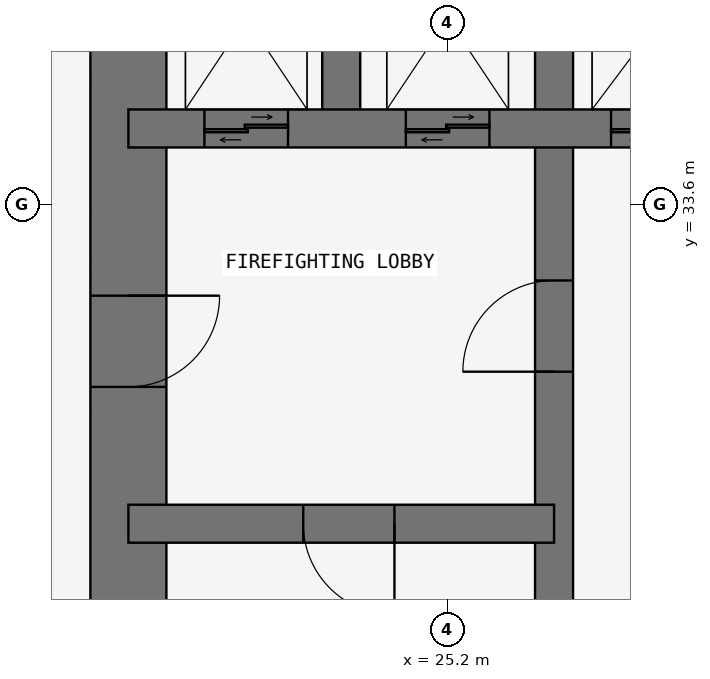
"""IFC4 building model, lengths in metres.
Left out: names, types, materials, properties, quantities, classifications, styles, units other than length and angle.
Written with IfcOpenShell. Run it as: python <this file> out.ifc"""

import sys

from ifc_helpers import new_model, si_unit, direction, frame, frame_2d, origin, place, context, subcontext, project, spatial, rectangle, extrude, element, fill, save


model = new_model("IFC4")
c1 = context("Model", 3, precision=1e-05, world=origin(), true_north=direction((0.0, 1.0)))
c2 = subcontext(c1, "Body", "Model", "MODEL_VIEW")
j1 = project(units=[si_unit("LENGTHUNIT", "METRE"), si_unit("PLANEANGLEUNIT", "RADIAN")], contexts=[c1])
p1 = place(None, origin())
s1 = spatial("IfcSite", under=j1, at=p1, CompositionType="ELEMENT")
p2 = place(p1, origin())
s2 = spatial("IfcBuilding", under=s1, at=p2, CompositionType="ELEMENT")
p3 = place(p2, frame((0.0, 0.0, 15.0)))
s3 = spatial("IfcBuildingStorey", under=s2, at=p3, CompositionType="ELEMENT", Elevation=15.0)
p4 = place(p3, frame((21.0, 37.8, 0.0), z_axis=(0.0, 0.0, 1.0), x_axis=(0.0, -1.0, 0.0)))
e1 = element("IfcWall", 1, at=p4, inside=s3, PredefinedType="SHEAR", context=c2, shape_type="SweptSolid", body=[
    extrude(rectangle(XDim=17.3, YDim=1.0, at=frame_2d((8.65, 0.0))), origin(), (0.0, 0.0, 1.0), 4.5),
])
p5 = place(p4, frame((5.4, 0.0, 0.0)))
e2 = element("IfcOpeningElement", 2, at=p5, cuts=e1, PredefinedType="OPENING", context=c2, shape_type="SweptSolid", body=[
    extrude(rectangle(XDim=1.2, YDim=2.1, at=frame_2d((0.6, 1.05))), frame((0.0, 0.51, 0.0), z_axis=(0.0, -1.0, 0.0), x_axis=(1.0, 0.0, 0.0)), (0.0, 0.0, 1.0), 1.02),
])
p6 = place(p3, frame((26.6, 21.0, 0.0), z_axis=(0.0, 0.0, 1.0), x_axis=(0.0, 1.0, 0.0)))
e3 = element("IfcWall", 3, at=p6, inside=s3, PredefinedType="SHEAR", context=c2, shape_type="SweptSolid", body=[
    extrude(rectangle(XDim=16.8, YDim=0.5, at=frame_2d((8.4, 0.0))), origin(), (0.0, 0.0, 1.0), 4.5),
])
p7 = place(p6, frame((10.4, 0.0, 0.0)))
e4 = element("IfcOpeningElement", 4, at=p7, cuts=e3, PredefinedType="OPENING", context=c2, shape_type="SweptSolid", body=[
    extrude(rectangle(XDim=1.2, YDim=2.1, at=frame_2d((0.6, 1.05))), frame((0.0, 0.26, 0.0), z_axis=(0.0, -1.0, 0.0), x_axis=(1.0, 0.0, 0.0)), (0.0, 0.0, 1.0), 0.52),
])
p8 = place(p3, frame((21.0, 29.4, 0.0), z_axis=(0.0, 0.0, 1.0), x_axis=(1.0, 0.0, 0.0)))
e5 = element("IfcWall", 5, at=p8, inside=s3, PredefinedType="SHEAR", context=c2, shape_type="SweptSolid", body=[
    extrude(rectangle(XDim=5.6, YDim=0.5, at=frame_2d((2.8, 0.0))), origin(), (0.0, 0.0, 1.0), 4.5),
])
p9 = place(p8, frame((2.3, 0.0, 0.0)))
e6 = element("IfcOpeningElement", 6, at=p9, cuts=e5, PredefinedType="OPENING", context=c2, shape_type="SweptSolid", body=[
    extrude(rectangle(XDim=1.2, YDim=2.1, at=frame_2d((0.6, 1.05))), frame((0.0, 0.26, 0.0), z_axis=(0.0, -1.0, 0.0), x_axis=(1.0, 0.0, 0.0)), (0.0, 0.0, 1.0), 0.52),
])
p10 = place(p3, frame((21.0, 34.6, 0.0), z_axis=(0.0, 0.0, 1.0), x_axis=(1.0, 0.0, 0.0)))
e7 = element("IfcWall", 7, at=p10, inside=s3, PredefinedType="SHEAR", context=c2, shape_type="SweptSolid", body=[
    extrude(rectangle(XDim=11.2, YDim=0.5, at=frame_2d((5.6, 0.0))), origin(), (0.0, 0.0, 1.0), 4.5),
])
p11 = place(p10, frame((9.35, 0.0, 0.0)))
e8 = element("IfcOpeningElement", 8, at=p11, cuts=e7, PredefinedType="OPENING", context=c2, shape_type="SweptSolid", body=[
    extrude(rectangle(XDim=0.9, YDim=2.1, at=frame_2d((0.45, 1.05))), frame((0.0, 0.26, 0.0), z_axis=(0.0, -1.0, 0.0), x_axis=(1.0, 0.0, 0.0)), (0.0, 0.0, 1.0), 0.52),
])
p12 = place(p10, frame((1.0, 0.0, 0.0)))
e9 = element("IfcOpeningElement", 9, at=p12, cuts=e7, PredefinedType="OPENING", context=c2, shape_type="SweptSolid", body=[
    extrude(rectangle(XDim=1.1, YDim=2.1, at=frame_2d((0.55, 1.05))), frame((0.0, 0.26, 0.0), z_axis=(0.0, -1.0, 0.0), x_axis=(1.0, 0.0, 0.0)), (0.0, 0.0, 1.0), 0.52),
])
p13 = place(p10, frame((3.65, 0.0, 0.0)))
e10 = element("IfcOpeningElement", 10, at=p13, cuts=e7, PredefinedType="OPENING", context=c2, shape_type="SweptSolid", body=[
    extrude(rectangle(XDim=1.1, YDim=2.1, at=frame_2d((0.55, 1.05))), frame((0.0, 0.26, 0.0), z_axis=(0.0, -1.0, 0.0), x_axis=(1.0, 0.0, 0.0)), (0.0, 0.0, 1.0), 0.52),
])
p14 = place(p10, frame((6.35, 0.0, 0.0)))
e11 = element("IfcOpeningElement", 11, at=p14, cuts=e7, PredefinedType="OPENING", context=c2, shape_type="SweptSolid", body=[
    extrude(rectangle(XDim=1.3, YDim=2.1, at=frame_2d((0.65, 1.05))), frame((0.0, 0.26, 0.0), z_axis=(0.0, -1.0, 0.0), x_axis=(1.0, 0.0, 0.0)), (0.0, 0.0, 1.0), 0.52),
])
p15 = place(p3, frame((23.8, 34.6, 0.0), z_axis=(0.0, 0.0, 1.0), x_axis=(0.0, 1.0, 0.0)))
e12 = element("IfcWall", 12, at=p15, inside=s3, PredefinedType="SHEAR", context=c2, shape_type="SweptSolid", body=[
    extrude(rectangle(XDim=3.2, YDim=0.5, at=frame_2d((1.6, 0.0))), origin(), (0.0, 0.0, 1.0), 4.5),
])
p16 = place(p5, origin())
e13 = element("IfcDoor", 13, at=p16, inside=s3, OperationType="SINGLE_SWING_LEFT", PredefinedType="DOOR", context=c2, shape_type="SweptSolid", body=[
    extrude(rectangle(XDim=1.2, YDim=2.1, at=frame_2d((0.6, 1.05))), frame((0.0, 0.025, 0.0), z_axis=(0.0, -1.0, 0.0), x_axis=(1.0, 0.0, 0.0)), (0.0, 0.0, 1.0), 0.05),
])
fill(e2, e13)
p17 = place(p9, frame((1.2, 0.0, 0.0), z_axis=(0.0, 0.0, 1.0), x_axis=(-1.0, 0.0, 0.0)))
e14 = element("IfcDoor", 14, at=p17, inside=s3, OperationType="SINGLE_SWING_LEFT", PredefinedType="DOOR", context=c2, shape_type="SweptSolid", body=[
    extrude(rectangle(XDim=1.2, YDim=2.1, at=frame_2d((0.6, 1.05))), frame((0.0, 0.025, 0.0), z_axis=(0.0, -1.0, 0.0), x_axis=(1.0, 0.0, 0.0)), (0.0, 0.0, 1.0), 0.05),
])
fill(e6, e14)
p18 = place(p7, origin())
e15 = element("IfcDoor", 15, at=p18, inside=s3, OperationType="SINGLE_SWING_LEFT", PredefinedType="DOOR", context=c2, shape_type="SweptSolid", body=[
    extrude(rectangle(XDim=1.2, YDim=2.1, at=frame_2d((0.6, 1.05))), frame((0.0, 0.025, 0.0), z_axis=(0.0, -1.0, 0.0), x_axis=(1.0, 0.0, 0.0)), (0.0, 0.0, 1.0), 0.05),
])
fill(e4, e15)
p19 = place(p12, origin())
e16 = element("IfcDoor", 16, at=p19, inside=s3, OperationType="DOUBLE_DOOR_SLIDING", PredefinedType="DOOR", context=c2, shape_type="SweptSolid", body=[
    extrude(rectangle(XDim=1.1, YDim=2.1, at=frame_2d((0.55, 1.05))), frame((0.0, 0.025, 0.0), z_axis=(0.0, -1.0, 0.0), x_axis=(1.0, 0.0, 0.0)), (0.0, 0.0, 1.0), 0.05),
])
fill(e9, e16)
p20 = place(p13, origin())
e17 = element("IfcDoor", 17, at=p20, inside=s3, OperationType="DOUBLE_DOOR_SLIDING", PredefinedType="DOOR", context=c2, shape_type="SweptSolid", body=[
    extrude(rectangle(XDim=1.1, YDim=2.1, at=frame_2d((0.55, 1.05))), frame((0.0, 0.025, 0.0), z_axis=(0.0, -1.0, 0.0), x_axis=(1.0, 0.0, 0.0)), (0.0, 0.0, 1.0), 0.05),
])
fill(e10, e17)
p21 = place(p14, origin())
e18 = element("IfcDoor", 18, at=p21, inside=s3, OperationType="DOUBLE_DOOR_SLIDING", PredefinedType="DOOR", context=c2, shape_type="SweptSolid", body=[
    extrude(rectangle(XDim=1.3, YDim=2.1, at=frame_2d((0.65, 1.05))), frame((0.0, 0.025, 0.0), z_axis=(0.0, -1.0, 0.0), x_axis=(1.0, 0.0, 0.0)), (0.0, 0.0, 1.0), 0.05),
])
fill(e11, e18)
save(model, sys.argv[1])
